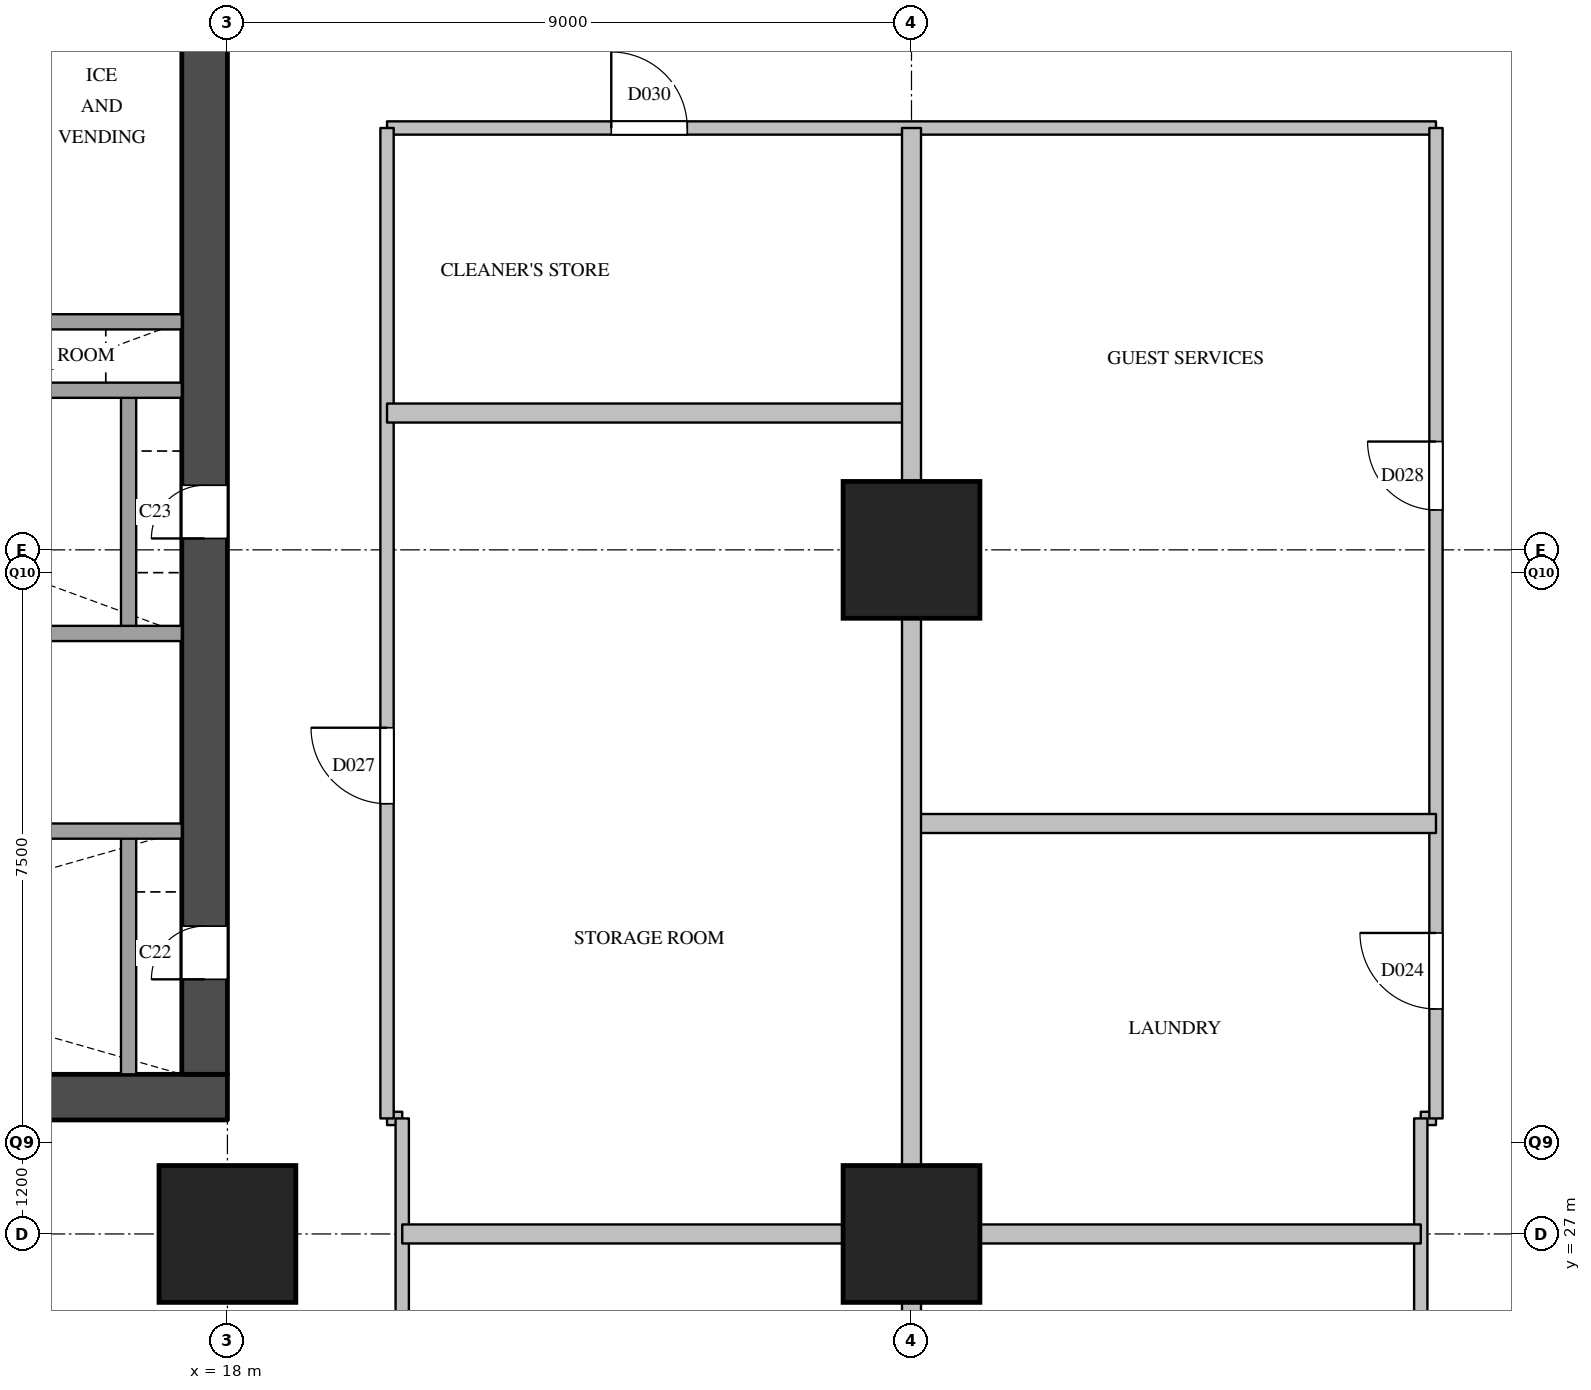
"""IFC4 building model, lengths in metres.
Left out: names, types, materials, properties, quantities, classifications, styles, units other than length and angle.
Written with IfcOpenShell. Run it as: python <this file> out.ifc"""

import sys

from ifc_helpers import new_model, si_unit, direction, frame, frame_2d, origin, origin_2d, place, context, subcontext, project, spatial, rectangle, extrude, element, fill, save


model = new_model("IFC4")
c1 = context("Model", 3, precision=1e-05, world=origin(), true_north=direction((0.0, 1.0)))
c2 = subcontext(c1, "Body", "Model", "MODEL_VIEW")
j1 = project(units=[si_unit("LENGTHUNIT", "METRE"), si_unit("PLANEANGLEUNIT", "RADIAN")], contexts=[c1])
p1 = place(None, origin())
s1 = spatial("IfcSite", under=j1, at=p1, CompositionType="ELEMENT")
p2 = place(p1, origin())
s2 = spatial("IfcBuilding", under=s1, at=p2, CompositionType="ELEMENT")
p3 = place(p2, frame((0.0, 0.0, 53.8)))
s3 = spatial("IfcBuildingStorey", under=s2, at=p3, CompositionType="ELEMENT", Elevation=53.8)
for number, where, z_axis, x_axis in (
    (1, (18.0, 27.0, 0.0), (0.0, 0.0, 1.0), (1.0, 0.0, 0.0)),
    (2, (27.0, 27.0, 0.0), (0.0, 0.0, 1.0), (1.0, 0.0, 0.0)),
    (3, (27.0, 36.0, 0.0), (0.0, 0.0, 1.0), (1.0, 0.0, 0.0)),
):
    element("IfcColumn", number, at=place(p3, frame(where, z_axis=z_axis, x_axis=x_axis)), inside=s3, PredefinedType="COLUMN", context=c2, shape_type="SweptSolid", body=[
        extrude(rectangle(XDim=1.8, YDim=1.8, at=origin_2d()), origin(), (0.0, 0.0, 1.0), 3.8),
    ])
p4 = place(p3, frame((5.6, 28.8, 0.0), z_axis=(0.0, 0.0, 1.0), x_axis=(1.0, 0.0, 0.0)))
e4 = element("IfcWall", 4, at=p4, inside=s3, PredefinedType="SHEAR", context=c2, shape_type="SweptSolid", body=[
    extrude(rectangle(XDim=12.4, YDim=0.6, at=frame_2d((6.2, 0.0))), origin(), (0.0, 0.0, 1.0), 3.5),
])
p5 = place(p4, frame((1.05, 0.0, 0.0)))
e5 = element("IfcOpeningElement", 5, at=p5, cuts=e4, PredefinedType="OPENING", context=c2, shape_type="SweptSolid", body=[
    extrude(rectangle(XDim=1.2, YDim=2.1, at=frame_2d((0.6, 1.05))), frame((0.0, 0.31, 0.0), z_axis=(0.0, -1.0, 0.0), x_axis=(1.0, 0.0, 0.0)), (0.0, 0.0, 1.0), 0.62),
])
p6 = place(p4, frame((5.25, 0.0, 0.0)))
e6 = element("IfcOpeningElement", 6, at=p6, cuts=e4, PredefinedType="OPENING", context=c2, shape_type="SweptSolid", body=[
    extrude(rectangle(XDim=1.2, YDim=2.1, at=frame_2d((0.6, 1.05))), frame((0.0, 0.31, 0.0), z_axis=(0.0, -1.0, 0.0), x_axis=(1.0, 0.0, 0.0)), (0.0, 0.0, 1.0), 0.62),
])
p7 = place(p4, frame((7.35, 0.0, 0.0)))
e7 = element("IfcOpeningElement", 7, at=p7, cuts=e4, PredefinedType="OPENING", context=c2, shape_type="SweptSolid", body=[
    extrude(rectangle(XDim=1.2, YDim=2.1, at=frame_2d((0.6, 1.05))), frame((0.0, 0.31, 0.0), z_axis=(0.0, -1.0, 0.0), x_axis=(1.0, 0.0, 0.0)), (0.0, 0.0, 1.0), 0.62),
])
p8 = place(p3, frame((17.7, 29.1, 0.0), z_axis=(0.0, 0.0, 1.0), x_axis=(0.0, 1.0, 0.0)))
e8 = element("IfcWall", 8, at=p8, inside=s3, PredefinedType="SHEAR", context=c2, shape_type="SweptSolid", body=[
    extrude(rectangle(XDim=20.3, YDim=0.6, at=frame_2d((10.15, 0.0))), origin(), (0.0, 0.0, 1.0), 3.5),
])
p9 = place(p8, frame((1.25, 0.0, 0.0)))
e9 = element("IfcOpeningElement", 9, at=p9, cuts=e8, PredefinedType="OPENING", context=c2, shape_type="SweptSolid", body=[
    extrude(rectangle(XDim=0.7, YDim=2.1, at=frame_2d((0.35, 1.05))), frame((0.0, 0.31, 0.0), z_axis=(0.0, -1.0, 0.0), x_axis=(1.0, 0.0, 0.0)), (0.0, 0.0, 1.0), 0.62),
])
p10 = place(p8, frame((7.05, 0.0, 0.0)))
e10 = element("IfcOpeningElement", 10, at=p10, cuts=e8, PredefinedType="OPENING", context=c2, shape_type="SweptSolid", body=[
    extrude(rectangle(XDim=0.7, YDim=2.1, at=frame_2d((0.35, 1.05))), frame((0.0, 0.31, 0.0), z_axis=(0.0, -1.0, 0.0), x_axis=(1.0, 0.0, 0.0)), (0.0, 0.0, 1.0), 0.62),
])
p11 = place(p3, frame((16.7, 29.1, 0.0), z_axis=(0.0, 0.0, 1.0), x_axis=(0.0, 1.0, 0.0)))
e11 = element("IfcWall", 11, at=p11, inside=s3, PredefinedType="SOLIDWALL", context=c2, shape_type="SweptSolid", body=[
    extrude(rectangle(XDim=3.2, YDim=0.2, at=frame_2d((1.6, 0.0))), origin(), (0.0, 0.0, 1.0), 3.5),
])
p12 = place(p3, frame((16.7, 34.9, 0.0), z_axis=(0.0, 0.0, 1.0), x_axis=(0.0, 1.0, 0.0)))
e12 = element("IfcWall", 12, at=p12, inside=s3, PredefinedType="SOLIDWALL", context=c2, shape_type="SweptSolid", body=[
    extrude(rectangle(XDim=3.2, YDim=0.2, at=frame_2d((1.6, 0.0))), origin(), (0.0, 0.0, 1.0), 3.5),
])
p13 = place(p3, frame((6.2, 32.3, 0.0), z_axis=(0.0, 0.0, 1.0), x_axis=(1.0, 0.0, 0.0)))
e13 = element("IfcWall", 13, at=p13, inside=s3, PredefinedType="SOLIDWALL", context=c2, shape_type="SweptSolid", body=[
    extrude(rectangle(XDim=11.2, YDim=0.2, at=frame_2d((5.6, 0.0))), origin(), (0.0, 0.0, 1.0), 3.5),
])
p14 = place(p13, frame((2.55, 0.0, 0.0)))
e14 = element("IfcOpeningElement", 14, at=p14, cuts=e13, PredefinedType="OPENING", context=c2, shape_type="SweptSolid", body=[
    extrude(rectangle(XDim=1.2, YDim=2.1, at=frame_2d((0.6, 1.05))), frame((0.0, 0.11, 0.0), z_axis=(0.0, -1.0, 0.0), x_axis=(1.0, 0.0, 0.0)), (0.0, 0.0, 1.0), 0.22),
])
p15 = place(p3, frame((6.2, 34.9, 0.0), z_axis=(0.0, 0.0, 1.0), x_axis=(1.0, 0.0, 0.0)))
e15 = element("IfcWall", 15, at=p15, inside=s3, PredefinedType="SOLIDWALL", context=c2, shape_type="SweptSolid", body=[
    extrude(rectangle(XDim=11.2, YDim=0.2, at=frame_2d((5.6, 0.0))), origin(), (0.0, 0.0, 1.0), 3.5),
])
p16 = place(p3, frame((6.2, 38.1, 0.0), z_axis=(0.0, 0.0, 1.0), x_axis=(1.0, 0.0, 0.0)))
e16 = element("IfcWall", 16, at=p16, inside=s3, PredefinedType="SOLIDWALL", context=c2, shape_type="SweptSolid", body=[
    extrude(rectangle(XDim=11.2, YDim=0.2, at=frame_2d((5.6, 0.0))), origin(), (0.0, 0.0, 1.0), 3.5),
])
p17 = place(p16, frame((0.45, 0.0, 0.0)))
e17 = element("IfcOpeningElement", 17, at=p17, cuts=e16, PredefinedType="OPENING", context=c2, shape_type="SweptSolid", body=[
    extrude(rectangle(XDim=1.2, YDim=2.1, at=frame_2d((0.6, 1.05))), frame((0.0, 0.11, 0.0), z_axis=(0.0, -1.0, 0.0), x_axis=(1.0, 0.0, 0.0)), (0.0, 0.0, 1.0), 0.22),
])
p18 = place(p16, frame((2.55, 0.0, 0.0)))
e18 = element("IfcOpeningElement", 18, at=p18, cuts=e16, PredefinedType="OPENING", context=c2, shape_type="SweptSolid", body=[
    extrude(rectangle(XDim=1.2, YDim=2.1, at=frame_2d((0.6, 1.05))), frame((0.0, 0.11, 0.0), z_axis=(0.0, -1.0, 0.0), x_axis=(1.0, 0.0, 0.0)), (0.0, 0.0, 1.0), 0.22),
])
p19 = place(p16, frame((4.65, 0.0, 0.0)))
e19 = element("IfcOpeningElement", 19, at=p19, cuts=e16, PredefinedType="OPENING", context=c2, shape_type="SweptSolid", body=[
    extrude(rectangle(XDim=1.2, YDim=2.1, at=frame_2d((0.6, 1.05))), frame((0.0, 0.11, 0.0), z_axis=(0.0, -1.0, 0.0), x_axis=(1.0, 0.0, 0.0)), (0.0, 0.0, 1.0), 0.22),
])
p20 = place(p16, frame((6.75, 0.0, 0.0)))
e20 = element("IfcOpeningElement", 20, at=p20, cuts=e16, PredefinedType="OPENING", context=c2, shape_type="SweptSolid", body=[
    extrude(rectangle(XDim=1.2, YDim=2.1, at=frame_2d((0.6, 1.05))), frame((0.0, 0.11, 0.0), z_axis=(0.0, -1.0, 0.0), x_axis=(1.0, 0.0, 0.0)), (0.0, 0.0, 1.0), 0.22),
])
p21 = place(p3, frame((12.5, 39.0, 0.0), z_axis=(0.0, 0.0, 1.0), x_axis=(1.0, 0.0, 0.0)))
e21 = element("IfcWall", 21, at=p21, inside=s3, PredefinedType="SOLIDWALL", context=c2, shape_type="SweptSolid", body=[
    extrude(rectangle(XDim=4.9, YDim=0.2, at=frame_2d((2.45, 0.0))), origin(), (0.0, 0.0, 1.0), 3.5),
])
for number, where, z_axis, x_axis in (
    (22, (20.1, 28.52, 0.0), (0.0, 0.0, 1.0), (1.0, 0.0, 0.0)),
    (23, (33.7, 28.52, 0.0), (0.0, 0.0, 1.0), (1.0, 0.0, 0.0)),
):
    element("IfcWall", number, at=place(p3, frame(where, z_axis=z_axis, x_axis=x_axis)), inside=s3, PredefinedType="PARTITIONING", context=c2, shape_type="SweptSolid", body=[
        extrude(rectangle(XDim=0.2, YDim=0.175, at=frame_2d((0.1, 0.0))), origin(), (0.0, 0.0, 1.0), 3.5),
    ])
p22 = place(p3, frame((20.1, 41.55, 0.0), z_axis=(0.0, 0.0, 1.0), x_axis=(1.0, 0.0, 0.0)))
e24 = element("IfcWall", 24, at=p22, inside=s3, PredefinedType="PARTITIONING", context=c2, shape_type="SweptSolid", body=[
    extrude(rectangle(XDim=13.8, YDim=0.175, at=frame_2d((6.9, 0.0))), origin(), (0.0, 0.0, 1.0), 2.5),
])
p23 = place(p22, frame((2.95, 0.0, 0.0)))
e25 = element("IfcOpeningElement", 25, at=p23, cuts=e24, PredefinedType="OPENING", context=c2, shape_type="SweptSolid", body=[
    extrude(rectangle(XDim=1.0, YDim=2.1, at=frame_2d((0.5, 1.05))), frame((0.0, 0.097, 0.0), z_axis=(0.0, -1.0, 0.0), x_axis=(1.0, 0.0, 0.0)), (0.0, 0.0, 1.0), 0.195),
])
p24 = place(p3, frame((20.1, 28.52, 0.0), z_axis=(0.0, 0.0, 1.0), x_axis=(0.0, 1.0, 0.0)))
e26 = element("IfcWall", 26, at=p24, inside=s3, PredefinedType="PARTITIONING", context=c2, shape_type="SweptSolid", body=[
    extrude(rectangle(XDim=13.03, YDim=0.175, at=frame_2d((6.515, 0.0))), origin(), (0.0, 0.0, 1.0), 3.5),
])
p25 = place(p24, frame((4.14, 0.0, 0.0)))
e27 = element("IfcOpeningElement", 27, at=p25, cuts=e26, PredefinedType="OPENING", context=c2, shape_type="SweptSolid", body=[
    extrude(rectangle(XDim=1.0, YDim=2.1, at=frame_2d((0.5, 1.05))), frame((0.0, 0.097, 0.0), z_axis=(0.0, -1.0, 0.0), x_axis=(1.0, 0.0, 0.0)), (0.0, 0.0, 1.0), 0.195),
])
for number, where, z_axis, x_axis in (
    (28, (20.3, 24.59, 0.0), (0.0, 0.0, 1.0), (0.0, 1.0, 0.0)),
    (29, (33.7, 24.59, 0.0), (0.0, 0.0, 1.0), (0.0, 1.0, 0.0)),
):
    element("IfcWall", number, at=place(p3, frame(where, z_axis=z_axis, x_axis=x_axis)), inside=s3, PredefinedType="PARTITIONING", context=c2, shape_type="SweptSolid", body=[
        extrude(rectangle(XDim=3.93, YDim=0.175, at=frame_2d((1.965, 0.0))), origin(), (0.0, 0.0, 1.0), 2.5),
    ])
p26 = place(p3, frame((33.9, 28.52, 0.0), z_axis=(0.0, 0.0, 1.0), x_axis=(0.0, 1.0, 0.0)))
e30 = element("IfcWall", 30, at=p26, inside=s3, PredefinedType="PARTITIONING", context=c2, shape_type="SweptSolid", body=[
    extrude(rectangle(XDim=13.03, YDim=0.175, at=frame_2d((6.515, 0.0))), origin(), (0.0, 0.0, 1.0), 3.5),
])
p27 = place(p26, frame((1.44, 0.0, 0.0)))
e31 = element("IfcOpeningElement", 31, at=p27, cuts=e30, PredefinedType="OPENING", context=c2, shape_type="SweptSolid", body=[
    extrude(rectangle(XDim=1.0, YDim=2.1, at=frame_2d((0.5, 1.05))), frame((0.0, 0.097, 0.0), z_axis=(0.0, -1.0, 0.0), x_axis=(1.0, 0.0, 0.0)), (0.0, 0.0, 1.0), 0.195),
])
p28 = place(p26, frame((8.005, 0.0, 0.0)))
e32 = element("IfcOpeningElement", 32, at=p28, cuts=e30, PredefinedType="OPENING", context=c2, shape_type="SweptSolid", body=[
    extrude(rectangle(XDim=0.9, YDim=2.1, at=frame_2d((0.45, 1.05))), frame((0.0, 0.097, 0.0), z_axis=(0.0, -1.0, 0.0), x_axis=(1.0, 0.0, 0.0)), (0.0, 0.0, 1.0), 0.195),
])
p29 = place(p3, frame((20.3, 27.0, 0.0), z_axis=(0.0, 0.0, 1.0), x_axis=(1.0, 0.0, 0.0)))
e33 = element("IfcWall", 33, at=p29, inside=s3, PredefinedType="PARTITIONING", context=c2, shape_type="SweptSolid", body=[
    extrude(rectangle(XDim=13.4, YDim=0.25, at=frame_2d((6.7, 0.0))), origin(), (0.0, 0.0, 1.0), 2.5),
])
for number, where, z_axis, x_axis in (
    (34, (27.0, 32.4, 0.0), (0.0, 0.0, 1.0), (1.0, 0.0, 0.0)),
    (35, (20.1, 37.8, 0.0), (0.0, 0.0, 1.0), (1.0, 0.0, 0.0)),
):
    element("IfcWall", number, at=place(p3, frame(where, z_axis=z_axis, x_axis=x_axis)), inside=s3, PredefinedType="PARTITIONING", context=c2, shape_type="SweptSolid", body=[
        extrude(rectangle(XDim=6.9, YDim=0.25, at=frame_2d((3.45, 0.0))), origin(), (0.0, 0.0, 1.0), 2.5),
    ])
p30 = place(p3, frame((27.0, 16.65, 0.0), z_axis=(0.0, 0.0, 1.0), x_axis=(0.0, 1.0, 0.0)))
e36 = element("IfcWall", 36, at=p30, inside=s3, PredefinedType="PARTITIONING", context=c2, shape_type="SweptSolid", body=[
    extrude(rectangle(XDim=24.9, YDim=0.25, at=frame_2d((12.45, 0.0))), origin(), (0.0, 0.0, 1.0), 2.5),
])
p31 = place(p9, origin())
e37 = element("IfcDoor", 37, at=p31, inside=s3, OperationType="SINGLE_SWING_LEFT", PredefinedType="DOOR", context=c2, shape_type="SweptSolid", body=[
    extrude(rectangle(XDim=0.7, YDim=2.1, at=frame_2d((0.35, 1.05))), frame((0.0, 0.025, 0.0), z_axis=(0.0, -1.0, 0.0), x_axis=(1.0, 0.0, 0.0)), (0.0, 0.0, 1.0), 0.05),
])
fill(e9, e37)
p32 = place(p10, origin())
e38 = element("IfcDoor", 38, at=p32, inside=s3, OperationType="SINGLE_SWING_LEFT", PredefinedType="DOOR", context=c2, shape_type="SweptSolid", body=[
    extrude(rectangle(XDim=0.7, YDim=2.1, at=frame_2d((0.35, 1.05))), frame((0.0, 0.025, 0.0), z_axis=(0.0, -1.0, 0.0), x_axis=(1.0, 0.0, 0.0)), (0.0, 0.0, 1.0), 0.05),
])
fill(e10, e38)
p33 = place(p27, origin())
e39 = element("IfcDoor", 39, at=p33, inside=s3, OperationType="SINGLE_SWING_RIGHT", PredefinedType="DOOR", context=c2, shape_type="SweptSolid", body=[
    extrude(rectangle(XDim=1.0, YDim=2.1, at=frame_2d((0.5, 1.05))), frame((0.0, 0.025, 0.0), z_axis=(0.0, -1.0, 0.0), x_axis=(1.0, 0.0, 0.0)), (0.0, 0.0, 1.0), 0.05),
])
fill(e31, e39)
p34 = place(p25, origin())
e40 = element("IfcDoor", 40, at=p34, inside=s3, OperationType="SINGLE_SWING_RIGHT", PredefinedType="DOOR", context=c2, shape_type="SweptSolid", body=[
    extrude(rectangle(XDim=1.0, YDim=2.1, at=frame_2d((0.5, 1.05))), frame((0.0, 0.025, 0.0), z_axis=(0.0, -1.0, 0.0), x_axis=(1.0, 0.0, 0.0)), (0.0, 0.0, 1.0), 0.05),
])
fill(e27, e40)
p35 = place(p28, origin())
e41 = element("IfcDoor", 41, at=p35, inside=s3, OperationType="SINGLE_SWING_RIGHT", PredefinedType="DOOR", context=c2, shape_type="SweptSolid", body=[
    extrude(rectangle(XDim=0.9, YDim=2.1, at=frame_2d((0.45, 1.05))), frame((0.0, 0.025, 0.0), z_axis=(0.0, -1.0, 0.0), x_axis=(1.0, 0.0, 0.0)), (0.0, 0.0, 1.0), 0.05),
])
fill(e32, e41)
p36 = place(p23, origin())
e42 = element("IfcDoor", 42, at=p36, inside=s3, OperationType="SINGLE_SWING_LEFT", PredefinedType="DOOR", context=c2, shape_type="SweptSolid", body=[
    extrude(rectangle(XDim=1.0, YDim=2.1, at=frame_2d((0.5, 1.05))), frame((0.0, 0.025, 0.0), z_axis=(0.0, -1.0, 0.0), x_axis=(1.0, 0.0, 0.0)), (0.0, 0.0, 1.0), 0.05),
])
fill(e25, e42)
save(model, sys.argv[1])
